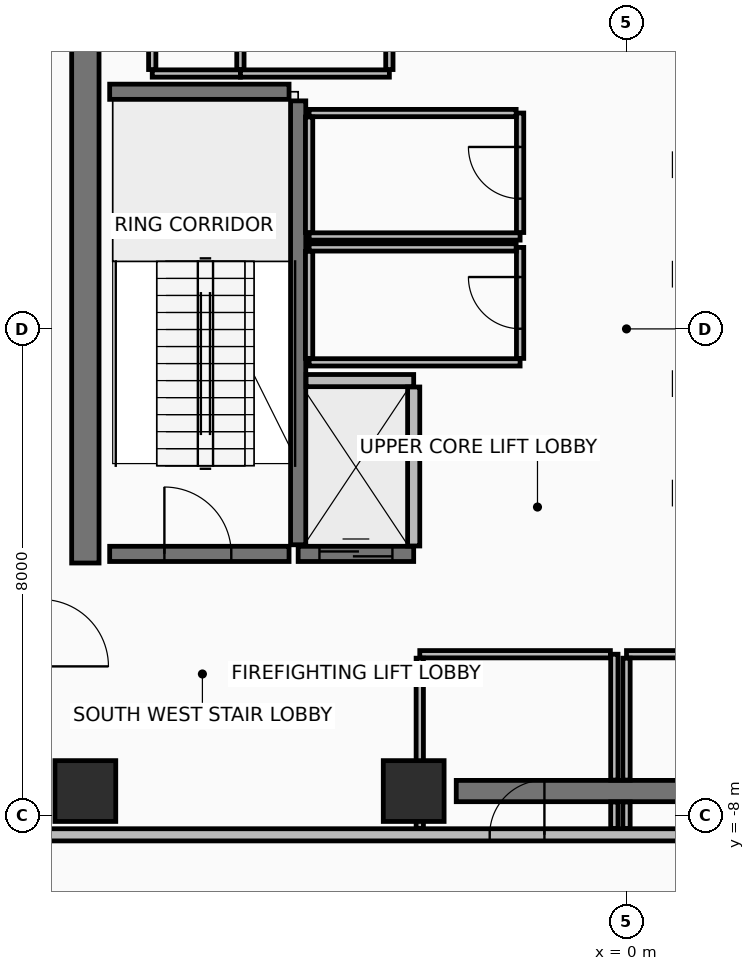
"""IFC4 building model, lengths in metres.
Left out: names, types, materials, properties, quantities, classifications, styles, units other than length and angle.
Written with IfcOpenShell. Run it as: python <this file> out.ifc"""

import sys

from ifc_helpers import new_model, si_unit, direction, frame, frame_2d, origin, origin_2d, place, context, subcontext, project, spatial, rectangle, extrude, element, fill, save


model = new_model("IFC4")
c1 = context("Model", 3, precision=1e-05, world=origin(), true_north=direction((0.0, 1.0)))
c2 = subcontext(c1, "Body", "Model", "MODEL_VIEW")
j1 = project(units=[si_unit("LENGTHUNIT", "METRE"), si_unit("PLANEANGLEUNIT", "RADIAN")], contexts=[c1])
p1 = place(None, origin())
s1 = spatial("IfcSite", under=j1, at=p1, CompositionType="ELEMENT")
p2 = place(p1, origin())
s2 = spatial("IfcBuilding", under=s1, at=p2, CompositionType="ELEMENT")
p3 = place(p2, frame((0.0, 0.0, 248.65)))
s3 = spatial("IfcBuildingStorey", under=s2, at=p3, CompositionType="ELEMENT", Elevation=248.65)
for number, where, z_axis, x_axis in (
    (1, (-8.9, -7.6, 0.0), (0.0, 0.0, 1.0), (1.0, 0.0, 0.0)),
    (2, (-3.5, -7.6, 0.0), (0.0, 0.0, 1.0), (1.0, 0.0, 0.0)),
):
    element("IfcColumn", number, at=place(p3, frame(where, z_axis=z_axis, x_axis=x_axis)), inside=s3, PredefinedType="COLUMN", context=c2, shape_type="SweptSolid", body=[
        extrude(rectangle(XDim=1.0, YDim=1.0, at=origin_2d()), origin(), (0.0, 0.0, 1.0), 4.75),
    ])
p4 = place(p3, frame((-2.8, -7.6, 0.0), z_axis=(0.0, 0.0, 1.0), x_axis=(1.0, 0.0, 0.0)))
e3 = element("IfcWall", 3, at=p4, inside=s3, PredefinedType="SHEAR", context=c2, shape_type="SweptSolid", body=[
    extrude(rectangle(XDim=5.38, YDim=0.35, at=frame_2d((2.69, 0.0))), origin(), (0.0, 0.0, 1.0), 4.56),
])
p5 = place(p3, frame((-8.9, -3.85, 0.0), z_axis=(0.0, 0.0, 1.0), x_axis=(0.0, 1.0, 0.0)))
e4 = element("IfcWall", 4, at=p5, inside=s3, PredefinedType="SHEAR", context=c2, shape_type="SweptSolid", body=[
    extrude(rectangle(XDim=10.7, YDim=0.45, at=frame_2d((5.35, 0.0))), origin(), (0.0, 0.0, 1.0), 4.56),
])
p6 = place(p3, frame((-9.62, -8.32, 0.0), z_axis=(0.0, 0.0, 1.0), x_axis=(1.0, 0.0, 0.0)))
e5 = element("IfcWall", 5, at=p6, inside=s3, PredefinedType="PARTITIONING", context=c2, shape_type="SweptSolid", body=[
    extrude(rectangle(XDim=19.24, YDim=0.2, at=frame_2d((9.62, 0.0))), origin(), (0.0, 0.0, 1.0), 2.355),
])
p7 = place(p6, frame((7.37, 0.0, 0.0)))
e6 = element("IfcOpeningElement", 6, at=p7, cuts=e5, PredefinedType="OPENING", context=c2, shape_type="SweptSolid", body=[
    extrude(rectangle(XDim=0.9, YDim=2.1, at=frame_2d((0.45, 1.05))), frame((0.0, 0.11, 0.0), z_axis=(0.0, -1.0, 0.0), x_axis=(1.0, 0.0, 0.0)), (0.0, 0.0, 1.0), 0.22),
])
p8 = place(p6, frame((10.77, 0.0, 0.0)))
e7 = element("IfcOpeningElement", 7, at=p8, cuts=e5, PredefinedType="OPENING", context=c2, shape_type="SweptSolid", body=[
    extrude(rectangle(XDim=0.9, YDim=2.1, at=frame_2d((0.45, 1.05))), frame((0.0, 0.11, 0.0), z_axis=(0.0, -1.0, 0.0), x_axis=(1.0, 0.0, 0.0)), (0.0, 0.0, 1.0), 0.22),
])
p9 = place(p6, frame((13.97, 0.0, 0.0)))
e8 = element("IfcOpeningElement", 8, at=p9, cuts=e5, PredefinedType="OPENING", context=c2, shape_type="SweptSolid", body=[
    extrude(rectangle(XDim=0.9, YDim=2.1, at=frame_2d((0.45, 1.05))), frame((0.0, 0.11, 0.0), z_axis=(0.0, -1.0, 0.0), x_axis=(1.0, 0.0, 0.0)), (0.0, 0.0, 1.0), 0.22),
])
p10 = place(p3, frame((-5.4, -3.55, 0.0), z_axis=(0.0, 0.0, 1.0), x_axis=(0.0, 1.0, 0.0)))
e9 = element("IfcWall", 9, at=p10, inside=s3, PredefinedType="SHEAR", context=c2, shape_type="SweptSolid", body=[
    extrude(rectangle(XDim=7.3, YDim=0.25, at=frame_2d((3.65, 0.0))), origin(), (0.0, 0.0, 1.0), 4.56),
])
p11 = place(p3, frame((-8.5, -3.7, 0.0), z_axis=(0.0, 0.0, 1.0), x_axis=(1.0, 0.0, 0.0)))
e10 = element("IfcWall", 10, at=p11, inside=s3, PredefinedType="SHEAR", context=c2, shape_type="SweptSolid", body=[
    extrude(rectangle(XDim=2.95, YDim=0.25, at=frame_2d((1.475, 0.0))), origin(), (0.0, 0.0, 1.0), 4.56),
])
p12 = place(p11, frame((0.9, 0.0, 0.0)))
e11 = element("IfcOpeningElement", 11, at=p12, cuts=e10, PredefinedType="OPENING", context=c2, shape_type="SweptSolid", body=[
    extrude(rectangle(XDim=1.1, YDim=2.15, at=frame_2d((0.55, 1.075))), frame((0.0, 0.135, 0.0), z_axis=(0.0, -1.0, 0.0), x_axis=(1.0, 0.0, 0.0)), (0.0, 0.0, 1.0), 0.27),
])
p13 = place(p3, frame((-8.5, 3.9, 0.0), z_axis=(0.0, 0.0, 1.0), x_axis=(1.0, 0.0, 0.0)))
e12 = element("IfcWall", 12, at=p13, inside=s3, PredefinedType="SHEAR", context=c2, shape_type="SweptSolid", body=[
    extrude(rectangle(XDim=2.95, YDim=0.25, at=frame_2d((1.475, 0.0))), origin(), (0.0, 0.0, 1.0), 4.56),
])
p14 = place(p3, frame((-5.4, -3.7, 0.0), z_axis=(0.0, 0.0, 1.0), x_axis=(1.0, 0.0, 0.0)))
e13 = element("IfcWall", 13, at=p14, inside=s3, PredefinedType="SHEAR", context=c2, shape_type="SweptSolid", body=[
    extrude(rectangle(XDim=1.9, YDim=0.25, at=frame_2d((0.95, 0.0))), origin(), (0.0, 0.0, 1.0), 4.56),
])
p15 = place(p14, frame((0.35, 0.0, 0.0)))
e14 = element("IfcOpeningElement", 14, at=p15, cuts=e13, PredefinedType="OPENING", context=c2, shape_type="SweptSolid", body=[
    extrude(rectangle(XDim=1.2, YDim=2.2, at=frame_2d((0.6, 1.1))), frame((0.0, 0.135, 0.0), z_axis=(0.0, -1.0, 0.0), x_axis=(1.0, 0.0, 0.0)), (0.0, 0.0, 1.0), 0.27),
])
p16 = place(p3, frame((-5.27, -0.85, 0.0), z_axis=(0.0, 0.0, 1.0), x_axis=(1.0, 0.0, 0.0)))
e15 = element("IfcWall", 15, at=p16, inside=s3, PredefinedType="PARTITIONING", context=c2, shape_type="SweptSolid", body=[
    extrude(rectangle(XDim=1.77, YDim=0.2, at=frame_2d((0.885, 0.0))), origin(), (0.0, 0.0, 1.0), 4.56),
])
p17 = place(p3, frame((-3.5, -3.57, 0.0), z_axis=(0.0, 0.0, 1.0), x_axis=(0.0, 1.0, 0.0)))
e16 = element("IfcWall", 16, at=p17, inside=s3, PredefinedType="PARTITIONING", context=c2, shape_type="SweptSolid", body=[
    extrude(rectangle(XDim=2.615, YDim=0.2, at=frame_2d((1.308, 0.0))), origin(), (0.0, 0.0, 1.0), 4.56),
])
p18 = place(p3, frame((-5.22, 1.52, 0.0), z_axis=(0.0, 0.0, 1.0), x_axis=(1.0, 0.0, 0.0)))
e17 = element("IfcWall", 17, at=p18, inside=s3, PredefinedType="PARTITIONING", context=c2, shape_type="SweptSolid", body=[
    extrude(rectangle(XDim=3.47, YDim=0.12, at=frame_2d((1.735, 0.0))), origin(), (0.0, 0.0, 1.0), 4.56),
])
p19 = place(p3, frame((-1.75, 1.585, 0.0), z_axis=(0.0, 0.0, 1.0), x_axis=(0.0, 1.0, 0.0)))
e18 = element("IfcWall", 18, at=p19, inside=s3, PredefinedType="PARTITIONING", context=c2, shape_type="SweptSolid", body=[
    extrude(rectangle(XDim=1.965, YDim=0.12, at=frame_2d((0.982, 0.0))), origin(), (0.0, 0.0, 1.0), 4.56),
])
p20 = place(p19, frame((0.557, 0.0, 0.0)))
e19 = element("IfcOpeningElement", 19, at=p20, cuts=e18, PredefinedType="OPENING", context=c2, shape_type="SweptSolid", body=[
    extrude(rectangle(XDim=0.85, YDim=2.1, at=frame_2d((0.425, 1.05))), frame((0.0, 0.07, 0.0), z_axis=(0.0, -1.0, 0.0), x_axis=(1.0, 0.0, 0.0)), (0.0, 0.0, 1.0), 0.14),
])
p21 = place(p3, frame((-1.815, 3.55, 0.0), z_axis=(0.0, 0.0, 1.0), x_axis=(-1.0, 0.0, 0.0)))
e20 = element("IfcWall", 20, at=p21, inside=s3, PredefinedType="PARTITIONING", context=c2, shape_type="SweptSolid", body=[
    extrude(rectangle(XDim=3.405, YDim=0.12, at=frame_2d((1.703, 0.0))), origin(), (0.0, 0.0, 1.0), 4.56),
])
p22 = place(p3, frame((-5.22, 3.485, 0.0), z_axis=(0.0, 0.0, 1.0), x_axis=(0.0, -1.0, 0.0)))
e21 = element("IfcWall", 21, at=p22, inside=s3, PredefinedType="PARTITIONING", context=c2, shape_type="SweptSolid", body=[
    extrude(rectangle(XDim=1.9, YDim=0.12, at=frame_2d((0.95, 0.0))), origin(), (0.0, 0.0, 1.0), 4.56),
])
p23 = place(p3, frame((-5.22, -0.55, 0.0), z_axis=(0.0, 0.0, 1.0), x_axis=(1.0, 0.0, 0.0)))
e22 = element("IfcWall", 22, at=p23, inside=s3, PredefinedType="PARTITIONING", context=c2, shape_type="SweptSolid", body=[
    extrude(rectangle(XDim=3.47, YDim=0.12, at=frame_2d((1.735, 0.0))), origin(), (0.0, 0.0, 1.0), 4.56),
])
p24 = place(p3, frame((-1.75, -0.485, 0.0), z_axis=(0.0, 0.0, 1.0), x_axis=(0.0, 1.0, 0.0)))
e23 = element("IfcWall", 23, at=p24, inside=s3, PredefinedType="PARTITIONING", context=c2, shape_type="SweptSolid", body=[
    extrude(rectangle(XDim=1.825, YDim=0.12, at=frame_2d((0.913, 0.0))), origin(), (0.0, 0.0, 1.0), 4.56),
])
p25 = place(p24, frame((0.488, 0.0, 0.0)))
e24 = element("IfcOpeningElement", 24, at=p25, cuts=e23, PredefinedType="OPENING", context=c2, shape_type="SweptSolid", body=[
    extrude(rectangle(XDim=0.85, YDim=2.1, at=frame_2d((0.425, 1.05))), frame((0.0, 0.07, 0.0), z_axis=(0.0, -1.0, 0.0), x_axis=(1.0, 0.0, 0.0)), (0.0, 0.0, 1.0), 0.14),
])
p26 = place(p3, frame((-1.815, 1.34, 0.0), z_axis=(0.0, 0.0, 1.0), x_axis=(-1.0, 0.0, 0.0)))
e25 = element("IfcWall", 25, at=p26, inside=s3, PredefinedType="PARTITIONING", context=c2, shape_type="SweptSolid", body=[
    extrude(rectangle(XDim=3.405, YDim=0.12, at=frame_2d((1.703, 0.0))), origin(), (0.0, 0.0, 1.0), 4.56),
])
p27 = place(p3, frame((-5.22, 1.275, 0.0), z_axis=(0.0, 0.0, 1.0), x_axis=(0.0, -1.0, 0.0)))
e26 = element("IfcWall", 26, at=p27, inside=s3, PredefinedType="PARTITIONING", context=c2, shape_type="SweptSolid", body=[
    extrude(rectangle(XDim=1.76, YDim=0.12, at=frame_2d((0.88, 0.0))), origin(), (0.0, 0.0, 1.0), 4.56),
])
p28 = place(p3, frame((-0.2, -8.215, 0.0), z_axis=(0.0, 0.0, 1.0), x_axis=(0.0, 1.0, 0.0)))
e27 = element("IfcWall", 27, at=p28, inside=s3, PredefinedType="PARTITIONING", context=c2, shape_type="SweptSolid", body=[
    extrude(rectangle(XDim=0.435, YDim=0.12, at=frame_2d((0.218, 0.0))), origin(), (0.0, 0.0, 1.0), 3.855),
])
p29 = place(p3, frame((-0.2, -7.42, 0.0), z_axis=(0.0, 0.0, 1.0), x_axis=(0.0, 1.0, 0.0)))
e28 = element("IfcWall", 28, at=p29, inside=s3, PredefinedType="PARTITIONING", context=c2, shape_type="SweptSolid", body=[
    extrude(rectangle(XDim=2.07, YDim=0.12, at=frame_2d((1.035, 0.0))), origin(), (0.0, 0.0, 1.0), 3.855),
])
p30 = place(p3, frame((-0.265, -5.35, 0.0), z_axis=(0.0, 0.0, 1.0), x_axis=(-1.0, 0.0, 0.0)))
e29 = element("IfcWall", 29, at=p30, inside=s3, PredefinedType="PARTITIONING", context=c2, shape_type="SweptSolid", body=[
    extrude(rectangle(XDim=3.135, YDim=0.12, at=frame_2d((1.567, 0.0))), origin(), (0.0, 0.0, 1.0), 3.855),
])
p31 = place(p3, frame((-3.4, -5.415, 0.0), z_axis=(0.0, 0.0, 1.0), x_axis=(0.0, -1.0, 0.0)))
e30 = element("IfcWall", 30, at=p31, inside=s3, PredefinedType="PARTITIONING", context=c2, shape_type="SweptSolid", body=[
    extrude(rectangle(XDim=2.8, YDim=0.12, at=frame_2d((1.4, 0.0))), origin(), (0.0, 0.0, 1.0), 2.355),
])
p32 = place(p3, frame((3.135, -5.35, 0.0), z_axis=(0.0, 0.0, 1.0), x_axis=(-1.0, 0.0, 0.0)))
e31 = element("IfcWall", 31, at=p32, inside=s3, PredefinedType="PARTITIONING", context=c2, shape_type="SweptSolid", body=[
    extrude(rectangle(XDim=3.135, YDim=0.12, at=frame_2d((1.567, 0.0))), origin(), (0.0, 0.0, 1.0), 4.56),
])
p33 = place(p3, frame((0.0, -5.415, 0.0), z_axis=(0.0, 0.0, 1.0), x_axis=(0.0, -1.0, 0.0)))
e32 = element("IfcWall", 32, at=p33, inside=s3, PredefinedType="PARTITIONING", context=c2, shape_type="SweptSolid", body=[
    extrude(rectangle(XDim=2.005, YDim=0.12, at=frame_2d((1.002, 0.0))), origin(), (0.0, 0.0, 1.0), 3.855),
])
p34 = place(p3, frame((0.0, -7.78, 0.0), z_axis=(0.0, 0.0, 1.0), x_axis=(0.0, -1.0, 0.0)))
e33 = element("IfcWall", 33, at=p34, inside=s3, PredefinedType="PARTITIONING", context=c2, shape_type="SweptSolid", body=[
    extrude(rectangle(XDim=0.435, YDim=0.12, at=frame_2d((0.218, 0.0))), origin(), (0.0, 0.0, 1.0), 3.855),
])
p35 = place(p3, frame((-7.8, 4.2, 0.0), z_axis=(0.0, 0.0, 1.0), x_axis=(1.0, 0.0, 0.0)))
e34 = element("IfcWall", 34, at=p35, inside=s3, PredefinedType="PARTITIONING", context=c2, shape_type="SweptSolid", body=[
    extrude(rectangle(XDim=1.45, YDim=0.12, at=frame_2d((0.725, 0.0))), origin(), (0.0, 0.0, 1.0), 4.56),
])
for number, where, z_axis, x_axis in (
    (35, (-6.35, 4.265, 0.0), (0.0, 0.0, 1.0), (0.0, 1.0, 0.0)),
    (36, (-7.8, 8.215, 0.0), (0.0, 0.0, 1.0), (0.0, -1.0, 0.0)),
):
    element("IfcWall", number, at=place(p3, frame(where, z_axis=z_axis, x_axis=x_axis)), inside=s3, PredefinedType="PARTITIONING", context=c2, shape_type="SweptSolid", body=[
        extrude(rectangle(XDim=3.95, YDim=0.12, at=frame_2d((1.975, 0.0))), origin(), (0.0, 0.0, 1.0), 3.855),
    ])
p36 = place(p3, frame((-6.35, 4.2, 0.0), z_axis=(0.0, 0.0, 1.0), x_axis=(1.0, 0.0, 0.0)))
e37 = element("IfcWall", 37, at=p36, inside=s3, PredefinedType="PARTITIONING", context=c2, shape_type="SweptSolid", body=[
    extrude(rectangle(XDim=2.45, YDim=0.12, at=frame_2d((1.225, 0.0))), origin(), (0.0, 0.0, 1.0), 4.56),
])
p37 = place(p3, frame((-3.9, 4.265, 0.0), z_axis=(0.0, 0.0, 1.0), x_axis=(0.0, 1.0, 0.0)))
e38 = element("IfcWall", 38, at=p37, inside=s3, PredefinedType="PARTITIONING", context=c2, shape_type="SweptSolid", body=[
    extrude(rectangle(XDim=3.95, YDim=0.12, at=frame_2d((1.975, 0.0))), origin(), (0.0, 0.0, 1.0), 3.855),
])
p38 = place(p12, origin())
e39 = element("IfcDoor", 39, at=p38, inside=s3, OperationType="SINGLE_SWING_LEFT", PredefinedType="DOOR", context=c2, shape_type="SweptSolid", body=[
    extrude(rectangle(XDim=1.1, YDim=2.15, at=frame_2d((0.55, 1.075))), frame((0.0, 0.025, 0.0), z_axis=(0.0, -1.0, 0.0), x_axis=(1.0, 0.0, 0.0)), (0.0, 0.0, 1.0), 0.05),
])
fill(e11, e39)
p39 = place(p15, origin())
e40 = element("IfcDoor", 40, at=p39, inside=s3, OperationType="SLIDING_TO_RIGHT", PredefinedType="DOOR", context=c2, shape_type="SweptSolid", body=[
    extrude(rectangle(XDim=1.2, YDim=2.2, at=frame_2d((0.6, 1.1))), frame((0.0, 0.025, 0.0), z_axis=(0.0, -1.0, 0.0), x_axis=(1.0, 0.0, 0.0)), (0.0, 0.0, 1.0), 0.05),
])
fill(e14, e40)
p40 = place(p20, frame((0.85, 0.0, 0.0), z_axis=(0.0, 0.0, 1.0), x_axis=(-1.0, 0.0, 0.0)))
e41 = element("IfcDoor", 41, at=p40, inside=s3, OperationType="SINGLE_SWING_RIGHT", PredefinedType="DOOR", context=c2, shape_type="SweptSolid", body=[
    extrude(rectangle(XDim=0.85, YDim=2.1, at=frame_2d((0.425, 1.05))), frame((0.0, 0.025, 0.0), z_axis=(0.0, -1.0, 0.0), x_axis=(1.0, 0.0, 0.0)), (0.0, 0.0, 1.0), 0.05),
])
fill(e19, e41)
p41 = place(p25, frame((0.85, 0.0, 0.0), z_axis=(0.0, 0.0, 1.0), x_axis=(-1.0, 0.0, 0.0)))
e42 = element("IfcDoor", 42, at=p41, inside=s3, OperationType="SINGLE_SWING_RIGHT", PredefinedType="DOOR", context=c2, shape_type="SweptSolid", body=[
    extrude(rectangle(XDim=0.85, YDim=2.1, at=frame_2d((0.425, 1.05))), frame((0.0, 0.025, 0.0), z_axis=(0.0, -1.0, 0.0), x_axis=(1.0, 0.0, 0.0)), (0.0, 0.0, 1.0), 0.05),
])
fill(e24, e42)
p42 = place(p7, frame((0.9, 0.0, 0.0), z_axis=(0.0, 0.0, 1.0), x_axis=(-1.0, 0.0, 0.0)))
e43 = element("IfcDoor", 43, at=p42, inside=s3, OperationType="SINGLE_SWING_LEFT", PredefinedType="DOOR", context=c2, shape_type="SweptSolid", body=[
    extrude(rectangle(XDim=0.9, YDim=2.1, at=frame_2d((0.45, 1.05))), frame((0.0, 0.025, 0.0), z_axis=(0.0, -1.0, 0.0), x_axis=(1.0, 0.0, 0.0)), (0.0, 0.0, 1.0), 0.05),
])
fill(e6, e43)
save(model, sys.argv[1])
